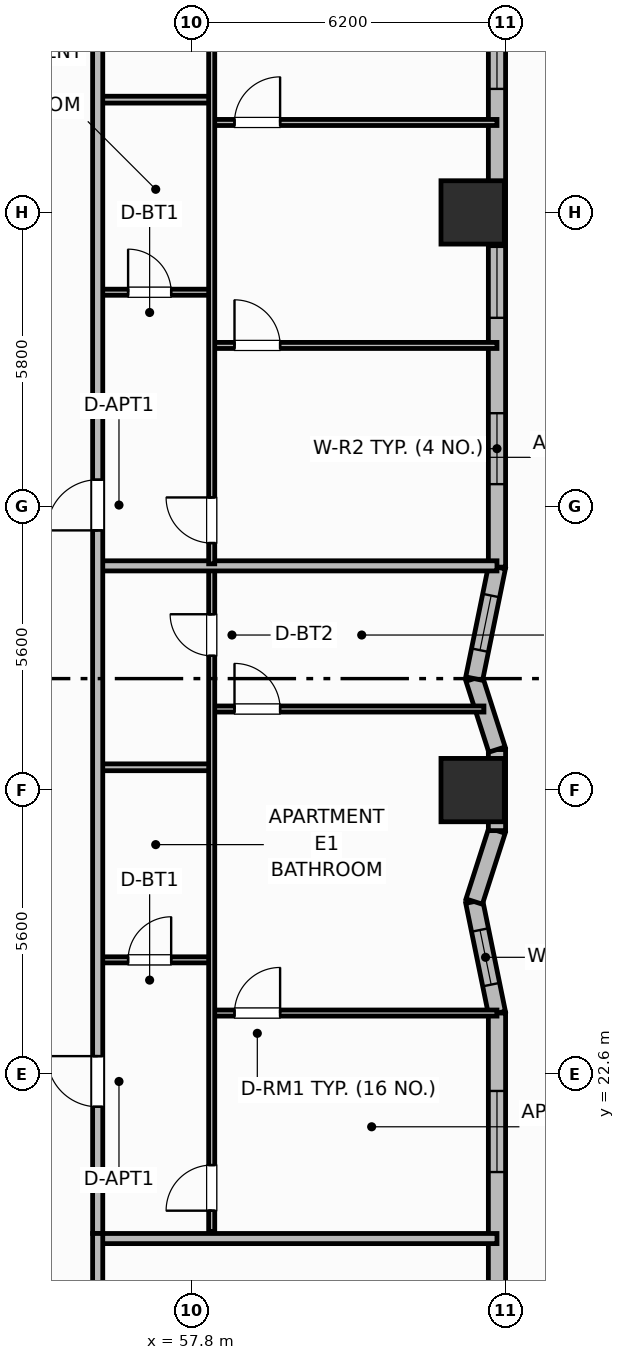
"""IFC4 building model, lengths in metres.
Left out: names, types, materials, properties, quantities, classifications, styles, units other than length and angle.
Written with IfcOpenShell. Run it as: python <this file> out.ifc"""

import sys

from ifc_helpers import new_model, si_unit, direction, frame, frame_2d, origin, origin_2d, place, context, subcontext, project, spatial, rectangle, extrude, element, fill, save


model = new_model("IFC4")
c1 = context("Model", 3, precision=1e-05, world=origin(), true_north=direction((0.0, 1.0)))
c2 = subcontext(c1, "Body", "Model", "MODEL_VIEW")
j1 = project(units=[si_unit("LENGTHUNIT", "METRE"), si_unit("PLANEANGLEUNIT", "RADIAN")], contexts=[c1])
p1 = place(None, origin())
s1 = spatial("IfcSite", under=j1, at=p1, CompositionType="ELEMENT")
p2 = place(p1, origin())
s2 = spatial("IfcBuilding", under=s1, at=p2, CompositionType="ELEMENT")
p3 = place(p2, frame((0.0, 0.0, 24.6)))
s3 = spatial("IfcBuildingStorey", under=s2, at=p3, CompositionType="ELEMENT", Elevation=24.6)
for number, where, z_axis, x_axis in (
    (1, (63.35, 28.2, 0.0), (0.0, 0.0, 1.0), (1.0, 0.0, 0.0)),
    (2, (63.35, 39.6, 0.0), (0.0, 0.0, 1.0), (1.0, 0.0, 0.0)),
):
    element("IfcColumn", number, at=place(p3, frame(where, z_axis=z_axis, x_axis=x_axis)), inside=s3, PredefinedType="COLUMN", context=c2, shape_type="SweptSolid", body=[
        extrude(rectangle(XDim=1.25, YDim=1.25, at=origin_2d()), origin(), (0.0, 0.0, 1.0), 4.2),
    ])
p4 = place(p3, frame((63.83, 9.0, 0.0), z_axis=(0.0, 0.0, 1.0), x_axis=(0.0, 1.0, 0.0)))
e3 = element("IfcWall", 3, at=p4, inside=s3, PredefinedType="SOLIDWALL", context=c2, shape_type="SweptSolid", body=[
    extrude(rectangle(XDim=14.8, YDim=0.34, at=frame_2d((7.4, 0.0))), origin(), (0.0, 0.0, 1.0), 3.2),
])
p5 = place(p4, frame((4.913, 0.0, 0.85)))
e4 = element("IfcOpeningElement", 4, at=p5, cuts=e3, PredefinedType="OPENING", context=c2, shape_type="SweptSolid", body=[
    extrude(rectangle(XDim=1.6, YDim=1.9, at=frame_2d((0.8, 0.95))), frame((0.0, 0.18, 0.0), z_axis=(0.0, -1.0, 0.0), x_axis=(1.0, 0.0, 0.0)), (0.0, 0.0, 1.0), 0.36),
])
p6 = place(p4, frame((11.663, 0.0, 0.85)))
e5 = element("IfcOpeningElement", 5, at=p6, cuts=e3, PredefinedType="OPENING", context=c2, shape_type="SweptSolid", body=[
    extrude(rectangle(XDim=1.6, YDim=1.9, at=frame_2d((0.8, 0.95))), frame((0.0, 0.18, 0.0), z_axis=(0.0, -1.0, 0.0), x_axis=(1.0, 0.0, 0.0)), (0.0, 0.0, 1.0), 0.36),
])
p7 = place(p3, frame((63.83, 23.8, 0.0), z_axis=(0.0, 0.0, 1.0), x_axis=(-0.200483989418, 0.979696978656, 0.0)))
e6 = element("IfcWall", 6, at=p7, inside=s3, PredefinedType="SOLIDWALL", context=c2, shape_type="SweptSolid", body=[
    extrude(rectangle(XDim=2.246, YDim=0.34, at=frame_2d((1.123, 0.0))), origin(), (0.0, 0.0, 1.0), 3.2),
])
p8 = place(p7, frame((0.573, 0.0, 0.95)))
e7 = element("IfcOpeningElement", 7, at=p8, cuts=e6, PredefinedType="OPENING", context=c2, shape_type="SweptSolid", body=[
    extrude(rectangle(XDim=1.1, YDim=1.65, at=frame_2d((0.55, 0.825))), frame((0.0, 0.18, 0.0), z_axis=(0.0, -1.0, 0.0), x_axis=(1.0, 0.0, 0.0)), (0.0, 0.0, 1.0), 0.36),
])
p9 = place(p3, frame((63.38, 26.0, 0.0), z_axis=(0.0, 0.0, 1.0), x_axis=(0.306148906283, 0.951983638085, 0.0)))
e8 = element("IfcWall", 8, at=p9, inside=s3, PredefinedType="SOLIDWALL", context=c2, shape_type="SweptSolid", body=[
    extrude(rectangle(XDim=1.47, YDim=0.34, at=frame_2d((0.735, 0.0))), origin(), (0.0, 0.0, 1.0), 3.2),
])
p10 = place(p3, frame((63.83, 27.4, 0.0), z_axis=(0.0, 0.0, 1.0), x_axis=(0.0, 1.0, 0.0)))
e9 = element("IfcWall", 9, at=p10, inside=s3, PredefinedType="SOLIDWALL", context=c2, shape_type="SweptSolid", body=[
    extrude(rectangle(XDim=1.6, YDim=0.34, at=frame_2d((0.8, 0.0))), origin(), (0.0, 0.0, 1.0), 3.2),
])
p11 = place(p3, frame((63.83, 29.0, 0.0), z_axis=(0.0, 0.0, 1.0), x_axis=(-0.306148906283, 0.951983638085, 0.0)))
e10 = element("IfcWall", 10, at=p11, inside=s3, PredefinedType="SOLIDWALL", context=c2, shape_type="SweptSolid", body=[
    extrude(rectangle(XDim=1.47, YDim=0.34, at=frame_2d((0.735, 0.0))), origin(), (0.0, 0.0, 1.0), 3.2),
])
p12 = place(p3, frame((63.38, 30.4, 0.0), z_axis=(0.0, 0.0, 1.0), x_axis=(0.200462637103, 0.979701347925, 0.0)))
e11 = element("IfcWall", 11, at=p12, inside=s3, PredefinedType="SOLIDWALL", context=c2, shape_type="SweptSolid", body=[
    extrude(rectangle(XDim=2.246, YDim=0.34, at=frame_2d((1.123, 0.0))), origin(), (0.0, 0.0, 1.0), 3.2),
])
p13 = place(p12, frame((0.573, 0.0, 0.95)))
e12 = element("IfcOpeningElement", 12, at=p13, cuts=e11, PredefinedType="OPENING", context=c2, shape_type="SweptSolid", body=[
    extrude(rectangle(XDim=1.1, YDim=1.65, at=frame_2d((0.55, 0.825))), frame((0.0, 0.18, 0.0), z_axis=(0.0, -1.0, 0.0), x_axis=(1.0, 0.0, 0.0)), (0.0, 0.0, 1.0), 0.36),
])
p14 = place(p3, frame((63.83, 32.6, 0.0), z_axis=(0.0, 0.0, 1.0), x_axis=(0.0, 1.0, 0.0)))
e13 = element("IfcWall", 13, at=p14, inside=s3, PredefinedType="SOLIDWALL", context=c2, shape_type="SweptSolid", body=[
    extrude(rectangle(XDim=14.8, YDim=0.34, at=frame_2d((7.4, 0.0))), origin(), (0.0, 0.0, 1.0), 3.2),
])
p15 = place(p14, frame((1.637, 0.0, 0.85)))
e14 = element("IfcOpeningElement", 14, at=p15, cuts=e13, PredefinedType="OPENING", context=c2, shape_type="SweptSolid", body=[
    extrude(rectangle(XDim=1.4, YDim=1.85, at=frame_2d((0.7, 0.925))), frame((0.0, 0.18, 0.0), z_axis=(0.0, -1.0, 0.0), x_axis=(1.0, 0.0, 0.0)), (0.0, 0.0, 1.0), 0.36),
])
p16 = place(p14, frame((4.92, 0.0, 0.85)))
e15 = element("IfcOpeningElement", 15, at=p16, cuts=e13, PredefinedType="OPENING", context=c2, shape_type="SweptSolid", body=[
    extrude(rectangle(XDim=1.4, YDim=1.85, at=frame_2d((0.7, 0.925))), frame((0.0, 0.18, 0.0), z_axis=(0.0, -1.0, 0.0), x_axis=(1.0, 0.0, 0.0)), (0.0, 0.0, 1.0), 0.36),
])
p17 = place(p14, frame((9.438, 0.0, 0.85)))
e16 = element("IfcOpeningElement", 16, at=p17, cuts=e13, PredefinedType="OPENING", context=c2, shape_type="SweptSolid", body=[
    extrude(rectangle(XDim=1.4, YDim=1.85, at=frame_2d((0.7, 0.925))), frame((0.0, 0.18, 0.0), z_axis=(0.0, -1.0, 0.0), x_axis=(1.0, 0.0, 0.0)), (0.0, 0.0, 1.0), 0.36),
])
p18 = place(p3, frame((55.95, 19.35, 0.0), z_axis=(0.0, 0.0, 1.0), x_axis=(1.0, 0.0, 0.0)))
e17 = element("IfcWall", 17, at=p18, inside=s3, PredefinedType="PARTITIONING", context=c2, shape_type="SweptSolid", body=[
    extrude(rectangle(XDim=7.88, YDim=0.2, at=frame_2d((3.94, 0.0))), origin(), (0.0, 0.0, 1.0), 3.03),
])
p19 = place(p3, frame((55.95, 24.85, 0.0), z_axis=(0.0, 0.0, 1.0), x_axis=(1.0, 0.0, 0.0)))
e18 = element("IfcWall", 18, at=p19, inside=s3, PredefinedType="PARTITIONING", context=c2, shape_type="SweptSolid", body=[
    extrude(rectangle(XDim=2.25, YDim=0.12, at=frame_2d((1.125, 0.0))), origin(), (0.0, 0.0, 1.0), 3.03),
])
p20 = place(p19, frame((0.6, 0.0, 0.0)))
e19 = element("IfcOpeningElement", 19, at=p20, cuts=e18, PredefinedType="OPENING", context=c2, shape_type="SweptSolid", body=[
    extrude(rectangle(XDim=0.85, YDim=2.1, at=frame_2d((0.425, 1.05))), frame((0.0, 0.07, 0.0), z_axis=(0.0, -1.0, 0.0), x_axis=(1.0, 0.0, 0.0)), (0.0, 0.0, 1.0), 0.14),
])
p21 = place(p3, frame((55.95, 28.65, 0.0), z_axis=(0.0, 0.0, 1.0), x_axis=(1.0, 0.0, 0.0)))
e20 = element("IfcWall", 20, at=p21, inside=s3, PredefinedType="PARTITIONING", context=c2, shape_type="SweptSolid", body=[
    extrude(rectangle(XDim=2.25, YDim=0.135, at=frame_2d((1.125, 0.0))), origin(), (0.0, 0.0, 1.0), 3.03),
])
p22 = place(p3, frame((58.2, 23.8, 0.0), z_axis=(0.0, 0.0, 1.0), x_axis=(1.0, 0.0, 0.0)))
e21 = element("IfcWall", 21, at=p22, inside=s3, PredefinedType="PARTITIONING", context=c2, shape_type="SweptSolid", body=[
    extrude(rectangle(XDim=5.63, YDim=0.12, at=frame_2d((2.815, 0.0))), origin(), (0.0, 0.0, 1.0), 3.03),
])
p23 = place(p22, frame((0.45, 0.0, 0.0)))
e22 = element("IfcOpeningElement", 22, at=p23, cuts=e21, PredefinedType="OPENING", context=c2, shape_type="SweptSolid", body=[
    extrude(rectangle(XDim=0.9, YDim=2.1, at=frame_2d((0.45, 1.05))), frame((0.0, 0.07, 0.0), z_axis=(0.0, -1.0, 0.0), x_axis=(1.0, 0.0, 0.0)), (0.0, 0.0, 1.0), 0.14),
])
p24 = place(p3, frame((58.2, 29.8, 0.0), z_axis=(0.0, 0.0, 1.0), x_axis=(1.0, 0.0, 0.0)))
e23 = element("IfcWall", 23, at=p24, inside=s3, PredefinedType="PARTITIONING", context=c2, shape_type="SweptSolid", body=[
    extrude(rectangle(XDim=5.373, YDim=0.12, at=frame_2d((2.687, 0.0))), origin(), (0.0, 0.0, 1.0), 3.03),
])
p25 = place(p24, frame((0.45, 0.0, 0.0)))
e24 = element("IfcOpeningElement", 24, at=p25, cuts=e23, PredefinedType="OPENING", context=c2, shape_type="SweptSolid", body=[
    extrude(rectangle(XDim=0.9, YDim=2.1, at=frame_2d((0.45, 1.05))), frame((0.0, 0.07, 0.0), z_axis=(0.0, -1.0, 0.0), x_axis=(1.0, 0.0, 0.0)), (0.0, 0.0, 1.0), 0.14),
])
p26 = place(p3, frame((58.2, 19.49, 0.0), z_axis=(0.0, 0.0, 1.0), x_axis=(0.0, 1.0, 0.0)))
e25 = element("IfcWall", 25, at=p26, inside=s3, PredefinedType="PARTITIONING", context=c2, shape_type="SweptSolid", body=[
    extrude(rectangle(XDim=13.095, YDim=0.12, at=frame_2d((6.547, 0.0))), origin(), (0.0, 0.0, 1.0), 3.03),
])
p27 = place(p26, frame((0.41, 0.0, 0.0)))
e26 = element("IfcOpeningElement", 26, at=p27, cuts=e25, PredefinedType="OPENING", context=c2, shape_type="SweptSolid", body=[
    extrude(rectangle(XDim=0.9, YDim=2.1, at=frame_2d((0.45, 1.05))), frame((0.0, 0.07, 0.0), z_axis=(0.0, -1.0, 0.0), x_axis=(1.0, 0.0, 0.0)), (0.0, 0.0, 1.0), 0.14),
])
p28 = place(p26, frame((11.36, 0.0, 0.0)))
e27 = element("IfcOpeningElement", 27, at=p28, cuts=e25, PredefinedType="OPENING", context=c2, shape_type="SweptSolid", body=[
    extrude(rectangle(XDim=0.82, YDim=2.08, at=frame_2d((0.41, 1.04))), frame((0.0, 0.07, 0.0), z_axis=(0.0, -1.0, 0.0), x_axis=(1.0, 0.0, 0.0)), (0.0, 0.0, 1.0), 0.14),
])
p29 = place(p3, frame((55.95, 32.625, 0.0), z_axis=(0.0, 0.0, 1.0), x_axis=(1.0, 0.0, 0.0)))
e28 = element("IfcWall", 28, at=p29, inside=s3, PredefinedType="PARTITIONING", context=c2, shape_type="SweptSolid", body=[
    extrude(rectangle(XDim=7.88, YDim=0.2, at=frame_2d((3.94, 0.0))), origin(), (0.0, 0.0, 1.0), 3.03),
])
p30 = place(p3, frame((55.95, 38.025, 0.0), z_axis=(0.0, 0.0, 1.0), x_axis=(1.0, 0.0, 0.0)))
e29 = element("IfcWall", 29, at=p30, inside=s3, PredefinedType="PARTITIONING", context=c2, shape_type="SweptSolid", body=[
    extrude(rectangle(XDim=2.25, YDim=0.12, at=frame_2d((1.125, 0.0))), origin(), (0.0, 0.0, 1.0), 3.03),
])
p31 = place(p30, frame((0.6, 0.0, 0.0)))
e30 = element("IfcOpeningElement", 30, at=p31, cuts=e29, PredefinedType="OPENING", context=c2, shape_type="SweptSolid", body=[
    extrude(rectangle(XDim=0.85, YDim=2.1, at=frame_2d((0.425, 1.05))), frame((0.0, 0.07, 0.0), z_axis=(0.0, -1.0, 0.0), x_axis=(1.0, 0.0, 0.0)), (0.0, 0.0, 1.0), 0.14),
])
p32 = place(p3, frame((55.95, 41.825, 0.0), z_axis=(0.0, 0.0, 1.0), x_axis=(1.0, 0.0, 0.0)))
e31 = element("IfcWall", 31, at=p32, inside=s3, PredefinedType="PARTITIONING", context=c2, shape_type="SweptSolid", body=[
    extrude(rectangle(XDim=2.25, YDim=0.135, at=frame_2d((1.125, 0.0))), origin(), (0.0, 0.0, 1.0), 3.03),
])
p33 = place(p3, frame((58.2, 36.975, 0.0), z_axis=(0.0, 0.0, 1.0), x_axis=(1.0, 0.0, 0.0)))
e32 = element("IfcWall", 32, at=p33, inside=s3, PredefinedType="PARTITIONING", context=c2, shape_type="SweptSolid", body=[
    extrude(rectangle(XDim=5.63, YDim=0.12, at=frame_2d((2.815, 0.0))), origin(), (0.0, 0.0, 1.0), 3.03),
])
p34 = place(p33, frame((0.45, 0.0, 0.0)))
e33 = element("IfcOpeningElement", 33, at=p34, cuts=e32, PredefinedType="OPENING", context=c2, shape_type="SweptSolid", body=[
    extrude(rectangle(XDim=0.9, YDim=2.1, at=frame_2d((0.45, 1.05))), frame((0.0, 0.07, 0.0), z_axis=(0.0, -1.0, 0.0), x_axis=(1.0, 0.0, 0.0)), (0.0, 0.0, 1.0), 0.14),
])
p35 = place(p3, frame((58.2, 41.375, 0.0), z_axis=(0.0, 0.0, 1.0), x_axis=(1.0, 0.0, 0.0)))
e34 = element("IfcWall", 34, at=p35, inside=s3, PredefinedType="PARTITIONING", context=c2, shape_type="SweptSolid", body=[
    extrude(rectangle(XDim=5.63, YDim=0.12, at=frame_2d((2.815, 0.0))), origin(), (0.0, 0.0, 1.0), 3.03),
])
p36 = place(p35, frame((0.45, 0.0, 0.0)))
e35 = element("IfcOpeningElement", 35, at=p36, cuts=e34, PredefinedType="OPENING", context=c2, shape_type="SweptSolid", body=[
    extrude(rectangle(XDim=0.9, YDim=2.1, at=frame_2d((0.45, 1.05))), frame((0.0, 0.07, 0.0), z_axis=(0.0, -1.0, 0.0), x_axis=(1.0, 0.0, 0.0)), (0.0, 0.0, 1.0), 0.14),
])
p37 = place(p3, frame((58.2, 32.665, 0.0), z_axis=(0.0, 0.0, 1.0), x_axis=(0.0, 1.0, 0.0)))
e36 = element("IfcWall", 36, at=p37, inside=s3, PredefinedType="PARTITIONING", context=c2, shape_type="SweptSolid", body=[
    extrude(rectangle(XDim=13.095, YDim=0.12, at=frame_2d((6.547, 0.0))), origin(), (0.0, 0.0, 1.0), 3.03),
])
p38 = place(p37, frame((0.41, 0.0, 0.0)))
e37 = element("IfcOpeningElement", 37, at=p38, cuts=e36, PredefinedType="OPENING", context=c2, shape_type="SweptSolid", body=[
    extrude(rectangle(XDim=0.9, YDim=2.1, at=frame_2d((0.45, 1.05))), frame((0.0, 0.07, 0.0), z_axis=(0.0, -1.0, 0.0), x_axis=(1.0, 0.0, 0.0)), (0.0, 0.0, 1.0), 0.14),
])
p39 = place(p37, frame((10.722, 0.0, 0.0)))
e38 = element("IfcOpeningElement", 38, at=p39, cuts=e36, PredefinedType="OPENING", context=c2, shape_type="SweptSolid", body=[
    extrude(rectangle(XDim=0.82, YDim=2.08, at=frame_2d((0.41, 1.04))), frame((0.0, 0.07, 0.0), z_axis=(0.0, -1.0, 0.0), x_axis=(1.0, 0.0, 0.0)), (0.0, 0.0, 1.0), 0.14),
])
p40 = place(p3, frame((55.95, 19.45, 0.0), z_axis=(0.0, 0.0, 1.0), x_axis=(0.0, 1.0, 0.0)))
e39 = element("IfcWall", 39, at=p40, inside=s3, PredefinedType="PARTITIONING", context=c2, shape_type="SweptSolid", body=[
    extrude(rectangle(XDim=26.35, YDim=0.2, at=frame_2d((13.175, 0.0))), origin(), (0.0, 0.0, 1.0), 3.03),
])
p41 = place(p40, frame((2.5, 0.0, 0.0)))
e40 = element("IfcOpeningElement", 40, at=p41, cuts=e39, PredefinedType="OPENING", context=c2, shape_type="SweptSolid", body=[
    extrude(rectangle(XDim=1.0, YDim=2.15, at=frame_2d((0.5, 1.075))), frame((0.0, 0.11, 0.0), z_axis=(0.0, -1.0, 0.0), x_axis=(1.0, 0.0, 0.0)), (0.0, 0.0, 1.0), 0.22),
])
p42 = place(p40, frame((13.875, 0.0, 0.0)))
e41 = element("IfcOpeningElement", 41, at=p42, cuts=e39, PredefinedType="OPENING", context=c2, shape_type="SweptSolid", body=[
    extrude(rectangle(XDim=1.0, YDim=2.15, at=frame_2d((0.5, 1.075))), frame((0.0, 0.11, 0.0), z_axis=(0.0, -1.0, 0.0), x_axis=(1.0, 0.0, 0.0)), (0.0, 0.0, 1.0), 0.22),
])
p43 = place(p3, frame((55.95, 4.97, 0.0), z_axis=(0.0, 0.0, 1.0), x_axis=(0.0, 1.0, 0.0)))
e42 = element("IfcWall", 42, at=p43, inside=s3, PredefinedType="PARTITIONING", context=c2, shape_type="SweptSolid", body=[
    extrude(rectangle(XDim=14.48, YDim=0.2, at=frame_2d((7.24, 0.0))), origin(), (0.0, 0.0, 1.0), 3.03),
])
p44 = place(p6, origin())
e43 = element("IfcWindow", 43, at=p44, inside=s3, PartitioningType="SINGLE_PANEL", PredefinedType="WINDOW", context=c2, shape_type="SweptSolid", body=[
    extrude(rectangle(XDim=1.6, YDim=1.9, at=frame_2d((0.8, 0.95))), frame((0.0, 0.03, 0.0), z_axis=(0.0, -1.0, 0.0), x_axis=(1.0, 0.0, 0.0)), (0.0, 0.0, 1.0), 0.06),
])
fill(e5, e43)
p45 = place(p8, origin())
e44 = element("IfcWindow", 44, at=p45, inside=s3, PartitioningType="SINGLE_PANEL", PredefinedType="WINDOW", context=c2, shape_type="SweptSolid", body=[
    extrude(rectangle(XDim=1.1, YDim=1.65, at=frame_2d((0.55, 0.825))), frame((0.0, 0.03, 0.0), z_axis=(0.0, -1.0, 0.0), x_axis=(1.0, 0.0, 0.0)), (0.0, 0.0, 1.0), 0.06),
])
fill(e7, e44)
p46 = place(p13, origin())
e45 = element("IfcWindow", 45, at=p46, inside=s3, PartitioningType="SINGLE_PANEL", PredefinedType="WINDOW", context=c2, shape_type="SweptSolid", body=[
    extrude(rectangle(XDim=1.1, YDim=1.65, at=frame_2d((0.55, 0.825))), frame((0.0, 0.03, 0.0), z_axis=(0.0, -1.0, 0.0), x_axis=(1.0, 0.0, 0.0)), (0.0, 0.0, 1.0), 0.06),
])
fill(e12, e45)
p47 = place(p15, origin())
e46 = element("IfcWindow", 46, at=p47, inside=s3, PartitioningType="SINGLE_PANEL", PredefinedType="WINDOW", context=c2, shape_type="SweptSolid", body=[
    extrude(rectangle(XDim=1.4, YDim=1.85, at=frame_2d((0.7, 0.925))), frame((0.0, 0.03, 0.0), z_axis=(0.0, -1.0, 0.0), x_axis=(1.0, 0.0, 0.0)), (0.0, 0.0, 1.0), 0.06),
])
fill(e14, e46)
p48 = place(p16, origin())
e47 = element("IfcWindow", 47, at=p48, inside=s3, PartitioningType="SINGLE_PANEL", PredefinedType="WINDOW", context=c2, shape_type="SweptSolid", body=[
    extrude(rectangle(XDim=1.4, YDim=1.85, at=frame_2d((0.7, 0.925))), frame((0.0, 0.03, 0.0), z_axis=(0.0, -1.0, 0.0), x_axis=(1.0, 0.0, 0.0)), (0.0, 0.0, 1.0), 0.06),
])
fill(e15, e47)
p49 = place(p17, origin())
e48 = element("IfcWindow", 48, at=p49, inside=s3, PartitioningType="SINGLE_PANEL", PredefinedType="WINDOW", context=c2, shape_type="SweptSolid", body=[
    extrude(rectangle(XDim=1.4, YDim=1.85, at=frame_2d((0.7, 0.925))), frame((0.0, 0.03, 0.0), z_axis=(0.0, -1.0, 0.0), x_axis=(1.0, 0.0, 0.0)), (0.0, 0.0, 1.0), 0.06),
])
fill(e16, e48)
p50 = place(p20, origin())
e49 = element("IfcDoor", 49, at=p50, inside=s3, OperationType="SINGLE_SWING_RIGHT", PredefinedType="DOOR", context=c2, shape_type="SweptSolid", body=[
    extrude(rectangle(XDim=0.85, YDim=2.1, at=frame_2d((0.425, 1.05))), frame((0.0, 0.025, 0.0), z_axis=(0.0, -1.0, 0.0), x_axis=(1.0, 0.0, 0.0)), (0.0, 0.0, 1.0), 0.05),
])
fill(e19, e49)
p51 = place(p23, origin())
e50 = element("IfcDoor", 50, at=p51, inside=s3, OperationType="SINGLE_SWING_RIGHT", PredefinedType="DOOR", context=c2, shape_type="SweptSolid", body=[
    extrude(rectangle(XDim=0.9, YDim=2.1, at=frame_2d((0.45, 1.05))), frame((0.0, 0.025, 0.0), z_axis=(0.0, -1.0, 0.0), x_axis=(1.0, 0.0, 0.0)), (0.0, 0.0, 1.0), 0.05),
])
fill(e22, e50)
p52 = place(p25, origin())
e51 = element("IfcDoor", 51, at=p52, inside=s3, OperationType="SINGLE_SWING_LEFT", PredefinedType="DOOR", context=c2, shape_type="SweptSolid", body=[
    extrude(rectangle(XDim=0.9, YDim=2.1, at=frame_2d((0.45, 1.05))), frame((0.0, 0.025, 0.0), z_axis=(0.0, -1.0, 0.0), x_axis=(1.0, 0.0, 0.0)), (0.0, 0.0, 1.0), 0.05),
])
fill(e24, e51)
p53 = place(p27, origin())
e52 = element("IfcDoor", 52, at=p53, inside=s3, OperationType="SINGLE_SWING_LEFT", PredefinedType="DOOR", context=c2, shape_type="SweptSolid", body=[
    extrude(rectangle(XDim=0.9, YDim=2.1, at=frame_2d((0.45, 1.05))), frame((0.0, 0.025, 0.0), z_axis=(0.0, -1.0, 0.0), x_axis=(1.0, 0.0, 0.0)), (0.0, 0.0, 1.0), 0.05),
])
fill(e26, e52)
p54 = place(p28, origin())
e53 = element("IfcDoor", 53, at=p54, inside=s3, OperationType="SINGLE_SWING_RIGHT", PredefinedType="DOOR", context=c2, shape_type="SweptSolid", body=[
    extrude(rectangle(XDim=0.82, YDim=2.08, at=frame_2d((0.41, 1.04))), frame((0.0, 0.025, 0.0), z_axis=(0.0, -1.0, 0.0), x_axis=(1.0, 0.0, 0.0)), (0.0, 0.0, 1.0), 0.05),
])
fill(e27, e53)
p55 = place(p31, origin())
e54 = element("IfcDoor", 54, at=p55, inside=s3, OperationType="SINGLE_SWING_LEFT", PredefinedType="DOOR", context=c2, shape_type="SweptSolid", body=[
    extrude(rectangle(XDim=0.85, YDim=2.1, at=frame_2d((0.425, 1.05))), frame((0.0, 0.025, 0.0), z_axis=(0.0, -1.0, 0.0), x_axis=(1.0, 0.0, 0.0)), (0.0, 0.0, 1.0), 0.05),
])
fill(e30, e54)
p56 = place(p34, origin())
e55 = element("IfcDoor", 55, at=p56, inside=s3, OperationType="SINGLE_SWING_LEFT", PredefinedType="DOOR", context=c2, shape_type="SweptSolid", body=[
    extrude(rectangle(XDim=0.9, YDim=2.1, at=frame_2d((0.45, 1.05))), frame((0.0, 0.025, 0.0), z_axis=(0.0, -1.0, 0.0), x_axis=(1.0, 0.0, 0.0)), (0.0, 0.0, 1.0), 0.05),
])
fill(e33, e55)
p57 = place(p36, origin())
e56 = element("IfcDoor", 56, at=p57, inside=s3, OperationType="SINGLE_SWING_RIGHT", PredefinedType="DOOR", context=c2, shape_type="SweptSolid", body=[
    extrude(rectangle(XDim=0.9, YDim=2.1, at=frame_2d((0.45, 1.05))), frame((0.0, 0.025, 0.0), z_axis=(0.0, -1.0, 0.0), x_axis=(1.0, 0.0, 0.0)), (0.0, 0.0, 1.0), 0.05),
])
fill(e35, e56)
p58 = place(p38, origin())
e57 = element("IfcDoor", 57, at=p58, inside=s3, OperationType="SINGLE_SWING_RIGHT", PredefinedType="DOOR", context=c2, shape_type="SweptSolid", body=[
    extrude(rectangle(XDim=0.9, YDim=2.1, at=frame_2d((0.45, 1.05))), frame((0.0, 0.025, 0.0), z_axis=(0.0, -1.0, 0.0), x_axis=(1.0, 0.0, 0.0)), (0.0, 0.0, 1.0), 0.05),
])
fill(e37, e57)
p59 = place(p41, origin())
e58 = element("IfcDoor", 58, at=p59, inside=s3, OperationType="SINGLE_SWING_RIGHT", PredefinedType="DOOR", context=c2, shape_type="SweptSolid", body=[
    extrude(rectangle(XDim=1.0, YDim=2.15, at=frame_2d((0.5, 1.075))), frame((0.0, 0.025, 0.0), z_axis=(0.0, -1.0, 0.0), x_axis=(1.0, 0.0, 0.0)), (0.0, 0.0, 1.0), 0.05),
])
fill(e40, e58)
p60 = place(p42, origin())
e59 = element("IfcDoor", 59, at=p60, inside=s3, OperationType="SINGLE_SWING_LEFT", PredefinedType="DOOR", context=c2, shape_type="SweptSolid", body=[
    extrude(rectangle(XDim=1.0, YDim=2.15, at=frame_2d((0.5, 1.075))), frame((0.0, 0.025, 0.0), z_axis=(0.0, -1.0, 0.0), x_axis=(1.0, 0.0, 0.0)), (0.0, 0.0, 1.0), 0.05),
])
fill(e41, e59)
save(model, sys.argv[1])
